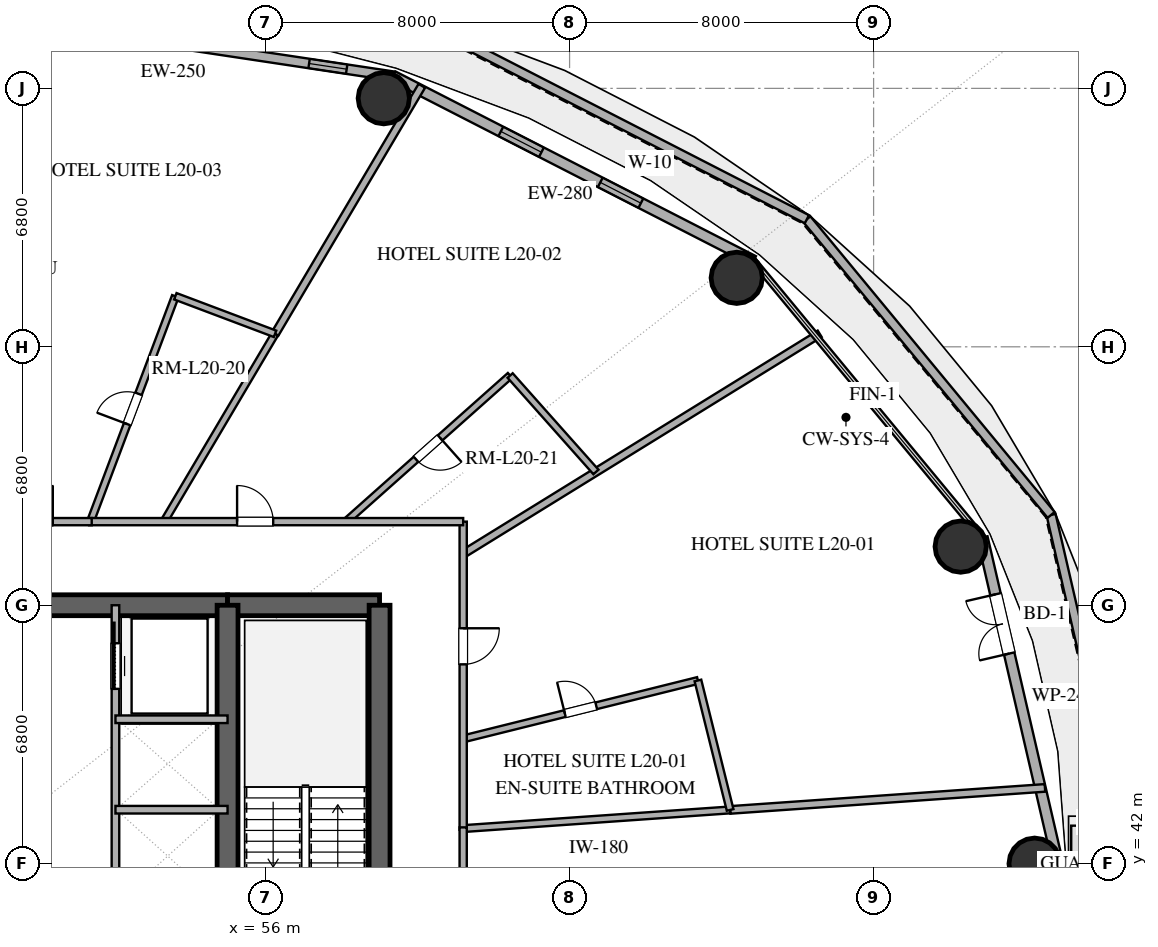
"""IFC4 building model, lengths in metres.
Left out: names, types, materials, properties, quantities, classifications, styles, units other than length and angle.
Written with IfcOpenShell. Run it as: python <this file> out.ifc"""

import sys

from ifc_helpers import new_model, si_unit, direction, frame, frame_2d, origin, origin_2d, place, context, subcontext, project, spatial, rectangle, hollow_circle, extrude, element, fill, save


model = new_model("IFC4")
c1 = context("Model", 3, precision=1e-05, world=origin(), true_north=direction((0.0, 1.0)))
c2 = subcontext(c1, "Body", "Model", "MODEL_VIEW")
j1 = project(units=[si_unit("LENGTHUNIT", "METRE"), si_unit("PLANEANGLEUNIT", "RADIAN")], contexts=[c1])
p1 = place(None, origin())
s1 = spatial("IfcSite", under=j1, at=p1, CompositionType="ELEMENT")
p2 = place(p1, origin())
s2 = spatial("IfcBuilding", under=s1, at=p2, CompositionType="ELEMENT")
p3 = place(p2, frame((0.0, 0.0, 84.0)))
s3 = spatial("IfcBuildingStorey", under=s2, at=p3, CompositionType="ELEMENT", Elevation=84.0)
p4 = place(p3, frame((41.0, 48.8, 0.0), z_axis=(0.0, 0.0, 1.0), x_axis=(1.0, 0.0, 0.0)))
e1 = element("IfcWall", 1, at=p4, inside=s3, PredefinedType="SHEAR", context=c2, shape_type="SweptSolid", body=[
    extrude(rectangle(XDim=14.0, YDim=0.55, at=frame_2d((7.0, 0.0))), origin(), (0.0, 0.0, 1.0), 3.38),
])
p5 = place(p4, frame((6.1, 0.0, 0.0)))
e2 = element("IfcOpeningElement", 2, at=p5, cuts=e1, PredefinedType="OPENING", context=c2, shape_type="SweptSolid", body=[
    extrude(rectangle(XDim=1.8, YDim=2.25, at=frame_2d((0.9, 1.125))), frame((0.0, 0.285, 0.0), z_axis=(0.0, -1.0, 0.0), x_axis=(1.0, 0.0, 0.0)), (0.0, 0.0, 1.0), 0.57),
])
p6 = place(p3, frame((55.0, 48.8, 0.0), z_axis=(0.0, 0.0, 1.0), x_axis=(1.0, 0.0, 0.0)))
e3 = element("IfcWall", 3, at=p6, inside=s3, PredefinedType="SHEAR", context=c2, shape_type="SweptSolid", body=[
    extrude(rectangle(XDim=4.0, YDim=0.55, at=frame_2d((2.0, 0.0))), origin(), (0.0, 0.0, 1.0), 3.38),
])
p7 = place(p3, frame((59.0, 35.2, 0.0), z_axis=(0.0, 0.0, 1.0), x_axis=(0.0, 1.0, 0.0)))
e4 = element("IfcWall", 4, at=p7, inside=s3, PredefinedType="SHEAR", context=c2, shape_type="SweptSolid", body=[
    extrude(rectangle(XDim=13.6, YDim=0.55, at=frame_2d((6.8, 0.0))), origin(), (0.0, 0.0, 1.0), 3.38),
])
p8 = place(p7, frame((1.5, 0.0, 0.0)))
e5 = element("IfcOpeningElement", 5, at=p8, cuts=e4, PredefinedType="OPENING", context=c2, shape_type="SweptSolid", body=[
    extrude(rectangle(XDim=1.2, YDim=2.15, at=frame_2d((0.6, 1.075))), frame((0.0, 0.285, 0.0), z_axis=(0.0, -1.0, 0.0), x_axis=(1.0, 0.0, 0.0)), (0.0, 0.0, 1.0), 0.57),
])
p9 = place(p3, frame((55.0, 35.2, 0.0), z_axis=(0.0, 0.0, 1.0), x_axis=(0.0, 1.0, 0.0)))
e6 = element("IfcWall", 6, at=p9, inside=s3, PredefinedType="SHEAR", context=c2, shape_type="SweptSolid", body=[
    extrude(rectangle(XDim=13.6, YDim=0.55, at=frame_2d((6.8, 0.0))), origin(), (0.0, 0.0, 1.0), 3.38),
])
p10 = place(p9, frame((1.15, 0.0, 0.0)))
e7 = element("IfcOpeningElement", 7, at=p10, cuts=e6, PredefinedType="OPENING", context=c2, shape_type="SweptSolid", body=[
    extrude(rectangle(XDim=1.1, YDim=2.2, at=frame_2d((0.55, 1.1))), frame((0.0, 0.285, 0.0), z_axis=(0.0, -1.0, 0.0), x_axis=(1.0, 0.0, 0.0)), (0.0, 0.0, 1.0), 0.57),
])
for number, where, z_axis, x_axis in (
    (8, (76.237, 42.0, 0.0), (0.0, 0.0, 1.0), (1.0, 0.0, 0.0)),
    (9, (74.291, 50.343, 0.0), (0.0, 0.0, 1.0), (1.0, 0.0, 0.0)),
    (10, (68.398, 57.415, 0.0), (0.0, 0.0, 1.0), (1.0, 0.0, 0.0)),
    (11, (59.11, 62.141, 0.0), (0.0, 0.0, 1.0), (1.0, 0.0, 0.0)),
):
    element("IfcColumn", number, at=place(p3, frame(where, z_axis=z_axis, x_axis=x_axis)), inside=s3, PredefinedType="COLUMN", context=c2, shape_type="SweptSolid", body=[
        extrude(hollow_circle(Radius=0.675, WallThickness=0.036, at=origin_2d()), origin(), (0.0, 0.0, 1.0), 3.38),
    ])
p11 = place(p3, frame((78.793, 42.0, 0.0), z_axis=(0.0, 0.0, 1.0), x_axis=(-0.225249461705, 0.974301123884, 0.0)))
e12 = element("IfcWall", 12, at=p11, inside=s3, PredefinedType="PARAPET", context=c2, shape_type="SweptSolid", body=[
    extrude(rectangle(XDim=9.419, YDim=0.24, at=frame_2d((4.709, 0.0))), origin(), (0.0, 0.0, 1.0), 1.25),
])
p12 = place(p3, frame((76.671, 51.177, 0.0), z_axis=(0.0, 0.0, 1.0), x_axis=(-0.636906456166, 0.770941091196, 0.0)))
e13 = element("IfcWall", 13, at=p12, inside=s3, PredefinedType="PARAPET", context=c2, shape_type="SweptSolid", body=[
    extrude(rectangle(XDim=10.091, YDim=0.24, at=frame_2d((5.045, 0.0))), origin(), (0.0, 0.0, 1.0), 1.25),
])
p13 = place(p3, frame((70.244, 58.956, 0.0), z_axis=(0.0, 0.0, 1.0), x_axis=(-0.889663800129, 0.456616165658, 0.0)))
e14 = element("IfcWall", 14, at=p13, inside=s3, PredefinedType="PARAPET", context=c2, shape_type="SweptSolid", body=[
    extrude(rectangle(XDim=11.384, YDim=0.24, at=frame_2d((5.692, 0.0))), origin(), (0.0, 0.0, 1.0), 1.25),
])
p14 = place(p3, frame((76.671, 32.823, 0.0), z_axis=(0.0, 0.0, 1.0), x_axis=(0.225249461705, 0.974301123884, 0.0)))
e15 = element("IfcWall", 15, at=p14, inside=s3, PredefinedType="PARAPET", context=c2, shape_type="SweptSolid", body=[
    extrude(rectangle(XDim=9.419, YDim=0.24, at=frame_2d((4.709, 0.0))), origin(), (0.0, 0.0, 1.0), 1.25),
])
p15 = place(p3, frame((76.849, 42.0, 0.0), z_axis=(0.0, 0.0, 1.0), x_axis=(-0.22558597182, 0.974223264616, 0.0)))
e16 = element("IfcWall", 16, at=p15, inside=s3, PredefinedType="SOLIDWALL", context=c2, shape_type="SweptSolid", body=[
    extrude(rectangle(XDim=8.811, YDim=0.28, at=frame_2d((4.405, 0.0))), origin(), (0.0, 0.0, 1.0), 3.38),
])
p16 = place(p15, frame((5.675, 0.0, 0.0)))
e17 = element("IfcOpeningElement", 17, at=p16, cuts=e16, PredefinedType="OPENING", context=c2, shape_type="SweptSolid", body=[
    extrude(rectangle(XDim=1.6, YDim=2.25, at=frame_2d((0.8, 1.125))), frame((0.0, 0.15, 0.0), z_axis=(0.0, -1.0, 0.0), x_axis=(1.0, 0.0, 0.0)), (0.0, 0.0, 1.0), 0.3),
])
p17 = place(p3, frame((68.84, 57.86, 0.0), z_axis=(0.0, 0.0, 1.0), x_axis=(-0.889959505023, 0.45603955905, 0.0)))
e18 = element("IfcWall", 18, at=p17, inside=s3, PredefinedType="SOLIDWALL", context=c2, shape_type="SweptSolid", body=[
    extrude(rectangle(XDim=10.662, YDim=0.28, at=frame_2d((5.331, 0.0))), origin(), (0.0, 0.0, 1.0), 3.38),
])
p18 = place(p17, frame((3.331, 0.0, 0.85)))
e19 = element("IfcOpeningElement", 19, at=p18, cuts=e18, PredefinedType="OPENING", context=c2, shape_type="SweptSolid", body=[
    extrude(rectangle(XDim=1.2, YDim=1.6, at=frame_2d((0.6, 0.8))), frame((0.0, 0.15, 0.0), z_axis=(0.0, -1.0, 0.0), x_axis=(1.0, 0.0, 0.0)), (0.0, 0.0, 1.0), 0.3),
])
p19 = place(p17, frame((6.271, 0.0, 0.85)))
e20 = element("IfcOpeningElement", 20, at=p19, cuts=e18, PredefinedType="OPENING", context=c2, shape_type="SweptSolid", body=[
    extrude(rectangle(XDim=1.2, YDim=1.6, at=frame_2d((0.6, 0.8))), frame((0.0, 0.15, 0.0), z_axis=(0.0, -1.0, 0.0), x_axis=(1.0, 0.0, 0.0)), (0.0, 0.0, 1.0), 0.3),
])
p20 = place(p3, frame((59.351, 62.723, 0.0), z_axis=(0.0, 0.0, 1.0), x_axis=(-0.988877774656, 0.148730450117, 0.0)))
e21 = element("IfcWall", 21, at=p20, inside=s3, PredefinedType="SOLIDWALL", context=c2, shape_type="SweptSolid", body=[
    extrude(rectangle(XDim=11.479, YDim=0.25, at=frame_2d((5.74, 0.0))), origin(), (0.0, 0.0, 1.0), 3.38),
])
p21 = place(p20, frame((1.231, 0.0, 1.42)))
e22 = element("IfcOpeningElement", 22, at=p21, cuts=e21, PredefinedType="OPENING", context=c2, shape_type="SweptSolid", body=[
    extrude(rectangle(XDim=1.0, YDim=1.05, at=frame_2d((0.5, 0.525))), frame((0.0, 0.135, 0.0), z_axis=(0.0, -1.0, 0.0), x_axis=(1.0, 0.0, 0.0)), (0.0, 0.0, 1.0), 0.27),
])
p22 = place(p3, frame((74.861, 33.417, 0.0), z_axis=(0.0, 0.0, 1.0), x_axis=(0.22558597182, 0.974223264616, 0.0)))
e23 = element("IfcWall", 23, at=p22, inside=s3, PredefinedType="SOLIDWALL", context=c2, shape_type="SweptSolid", body=[
    extrude(rectangle(XDim=8.811, YDim=0.25, at=frame_2d((4.405, 0.0))), origin(), (0.0, 0.0, 1.0), 3.38),
])
p23 = place(p3, frame((52.05, 38.4, 0.0), z_axis=(0.0, 0.0, 1.0), x_axis=(0.0, 1.0, 0.0)))
e24 = element("IfcWall", 24, at=p23, inside=s3, PredefinedType="SOLIDWALL", context=c2, shape_type="SweptSolid", body=[
    extrude(rectangle(XDim=10.4, YDim=0.2, at=frame_2d((5.2, 0.0))), origin(), (0.0, 0.0, 1.0), 2.74),
])
p24 = place(p23, frame((8.2, 0.0, 0.0)))
e25 = element("IfcOpeningElement", 25, at=p24, cuts=e24, PredefinedType="OPENING", context=c2, shape_type="SweptSolid", body=[
    extrude(rectangle(XDim=1.2, YDim=2.2, at=frame_2d((0.6, 1.1))), frame((0.0, 0.11, 0.0), z_axis=(0.0, -1.0, 0.0), x_axis=(1.0, 0.0, 0.0)), (0.0, 0.0, 1.0), 0.22),
])
for number, where, z_axis, x_axis in (
    (26, (52.05, 43.42, 0.0), (0.0, 0.0, 1.0), (1.0, 0.0, 0.0)),
    (27, (52.05, 45.8, 0.0), (0.0, 0.0, 1.0), (1.0, 0.0, 0.0)),
):
    element("IfcWall", number, at=place(p3, frame(where, z_axis=z_axis, x_axis=x_axis)), inside=s3, PredefinedType="SOLIDWALL", context=c2, shape_type="SweptSolid", body=[
        extrude(rectangle(XDim=2.95, YDim=0.2, at=frame_2d((1.475, 0.0))), origin(), (0.0, 0.0, 1.0), 2.74),
    ])
p25 = place(p3, frame((76.509, 43.994, 0.0), z_axis=(0.0, 0.0, 1.0), x_axis=(-0.997563838401, -0.069759503404, 0.0)))
e28 = element("IfcWall", 28, at=p25, inside=s3, PredefinedType="PARTITIONING", context=c2, shape_type="SweptSolid", body=[
    extrude(rectangle(XDim=8.305, YDim=0.2, at=frame_2d((4.152, 0.0))), origin(), (0.0, 0.0, 1.0), 2.74),
])
p26 = place(p3, frame((60.112, 62.468, 0.0), z_axis=(0.0, 0.0, 1.0), x_axis=(-0.509263960295, -0.860610375689, 0.0)))
e29 = element("IfcWall", 29, at=p26, inside=s3, PredefinedType="PARTITIONING", context=c2, shape_type="SweptSolid", body=[
    extrude(rectangle(XDim=7.583, YDim=0.2, at=frame_2d((3.792, 0.0))), origin(), (0.0, 0.0, 1.0), 2.74),
])
p27 = place(p3, frame((68.224, 43.414, 0.0), z_axis=(0.0, 0.0, 1.0), x_axis=(-0.997563891584, -0.06975874287, 0.0)))
e30 = element("IfcWall", 30, at=p27, inside=s3, PredefinedType="PLUMBINGWALL", context=c2, shape_type="SweptSolid", body=[
    extrude(rectangle(XDim=7.042, YDim=0.18, at=frame_2d((3.521, 0.0))), origin(), (0.0, 0.0, 1.0), 2.74),
])
p28 = place(p3, frame((61.2, 50.15, 0.0), z_axis=(0.0, 0.0, 1.0), x_axis=(0.850874276333, 0.525369361377, 0.0)))
e31 = element("IfcWall", 31, at=p28, inside=s3, PredefinedType="PARTITIONING", context=c2, shape_type="SweptSolid", body=[
    extrude(rectangle(XDim=11.026, YDim=0.2, at=frame_2d((5.513, 0.0))), origin(), (0.0, 0.0, 1.0), 2.74),
])
p29 = place(p3, frame((61.2, 45.284, 0.0), z_axis=(0.0, 0.0, 1.0), x_axis=(0.970426102609, 0.241398383125, 0.0)))
e32 = element("IfcWall", 32, at=p29, inside=s3, PredefinedType="PLUMBINGWALL", context=c2, shape_type="SweptSolid", body=[
    extrude(rectangle(XDim=6.365, YDim=0.18, at=frame_2d((3.183, 0.0))), origin(), (0.0, 0.0, 1.0), 2.74),
])
p30 = place(p29, frame((2.758, 0.0, 0.0)))
e33 = element("IfcOpeningElement", 33, at=p30, cuts=e32, PredefinedType="OPENING", context=c2, shape_type="SweptSolid", body=[
    extrude(rectangle(XDim=0.85, YDim=2.1, at=frame_2d((0.425, 1.05))), frame((0.0, 0.1, 0.0), z_axis=(0.0, -1.0, 0.0), x_axis=(1.0, 0.0, 0.0)), (0.0, 0.0, 1.0), 0.2),
])
p31 = place(p3, frame((51.391, 51.0, 0.0), z_axis=(0.0, 0.0, 1.0), x_axis=(0.352583810303, 0.935780239539, 0.0)))
e34 = element("IfcWall", 34, at=p31, inside=s3, PredefinedType="PLUMBINGWALL", context=c2, shape_type="SweptSolid", body=[
    extrude(rectangle(XDim=6.337, YDim=0.18, at=frame_2d((3.168, 0.0))), origin(), (0.0, 0.0, 1.0), 2.74),
])
p32 = place(p31, frame((2.744, 0.0, 0.0)))
e35 = element("IfcOpeningElement", 35, at=p32, cuts=e34, PredefinedType="OPENING", context=c2, shape_type="SweptSolid", body=[
    extrude(rectangle(XDim=0.85, YDim=2.1, at=frame_2d((0.425, 1.05))), frame((0.0, 0.1, 0.0), z_axis=(0.0, -1.0, 0.0), x_axis=(1.0, 0.0, 0.0)), (0.0, 0.0, 1.0), 0.2),
])
p33 = place(p3, frame((62.436, 54.844, 0.0), z_axis=(0.0, 0.0, 1.0), x_axis=(-0.747085499985, -0.664727956168, 0.0)))
e36 = element("IfcWall", 36, at=p33, inside=s3, PredefinedType="PLUMBINGWALL", context=c2, shape_type="SweptSolid", body=[
    extrude(rectangle(XDim=5.783, YDim=0.18, at=frame_2d((2.892, 0.0))), origin(), (0.0, 0.0, 1.0), 2.74),
])
p34 = place(p33, frame((2.467, 0.0, 0.0)))
e37 = element("IfcOpeningElement", 37, at=p34, cuts=e36, PredefinedType="OPENING", context=c2, shape_type="SweptSolid", body=[
    extrude(rectangle(XDim=0.85, YDim=2.1, at=frame_2d((0.425, 1.05))), frame((0.0, 0.1, 0.0), z_axis=(0.0, -1.0, 0.0), x_axis=(1.0, 0.0, 0.0)), (0.0, 0.0, 1.0), 0.2),
])
p35 = place(p3, frame((56.25, 55.941, 0.0), z_axis=(0.0, 0.0, 1.0), x_axis=(-0.509296473297, -0.860591135376, 0.0)))
e38 = element("IfcWall", 38, at=p35, inside=s3, PredefinedType="PLUMBINGWALL", context=c2, shape_type="SweptSolid", body=[
    extrude(rectangle(XDim=5.742, YDim=0.18, at=frame_2d((2.871, 0.0))), origin(), (0.0, 0.0, 1.0), 2.74),
])
p36 = place(p3, frame((61.2, 51.0, 0.0), z_axis=(0.0, 0.0, 1.0), x_axis=(0.0, -1.0, 0.0)))
e39 = element("IfcWall", 39, at=p36, inside=s3, PredefinedType="PARTITIONING", context=c2, shape_type="SweptSolid", body=[
    extrude(rectangle(XDim=8.109, YDim=0.19, at=frame_2d((4.055, 0.0))), origin(), (0.0, 0.0, 1.0), 2.74),
])
p37 = place(p36, frame((2.806, 0.0, 0.0)))
e40 = element("IfcOpeningElement", 40, at=p37, cuts=e39, PredefinedType="OPENING", context=c2, shape_type="SweptSolid", body=[
    extrude(rectangle(XDim=0.95, YDim=2.15, at=frame_2d((0.475, 1.075))), frame((0.0, 0.105, 0.0), z_axis=(0.0, -1.0, 0.0), x_axis=(1.0, 0.0, 0.0)), (0.0, 0.0, 1.0), 0.21),
])
p38 = place(p3, frame((51.357, 51.0, 0.0), z_axis=(0.0, 0.0, 1.0), x_axis=(1.0, 0.0, 0.0)))
e41 = element("IfcWall", 41, at=p38, inside=s3, PredefinedType="PARTITIONING", context=c2, shape_type="SweptSolid", body=[
    extrude(rectangle(XDim=9.843, YDim=0.19, at=frame_2d((4.921, 0.0))), origin(), (0.0, 0.0, 1.0), 2.74),
])
p39 = place(p38, frame((3.894, 0.0, 0.0)))
e42 = element("IfcOpeningElement", 42, at=p39, cuts=e41, PredefinedType="OPENING", context=c2, shape_type="SweptSolid", body=[
    extrude(rectangle(XDim=0.95, YDim=2.15, at=frame_2d((0.475, 1.075))), frame((0.0, 0.105, 0.0), z_axis=(0.0, -1.0, 0.0), x_axis=(1.0, 0.0, 0.0)), (0.0, 0.0, 1.0), 0.21),
])
p40 = place(p3, frame((43.812, 51.0, 0.0), z_axis=(0.0, 0.0, 1.0), x_axis=(1.0, 0.0, 0.0)))
e43 = element("IfcWall", 43, at=p40, inside=s3, PredefinedType="PARTITIONING", context=c2, shape_type="SweptSolid", body=[
    extrude(rectangle(XDim=7.613, YDim=0.19, at=frame_2d((3.807, 0.0))), origin(), (0.0, 0.0, 1.0), 2.74),
])
p41 = place(p40, frame((1.84, 0.0, 0.0)))
e44 = element("IfcOpeningElement", 44, at=p41, cuts=e43, PredefinedType="OPENING", context=c2, shape_type="SweptSolid", body=[
    extrude(rectangle(XDim=1.0, YDim=2.2, at=frame_2d((0.5, 1.1))), frame((0.0, 0.105, 0.0), z_axis=(0.0, -1.0, 0.0), x_axis=(1.0, 0.0, 0.0)), (0.0, 0.0, 1.0), 0.21),
])
p42 = place(p40, frame((5.639, 0.0, 0.0)))
e45 = element("IfcOpeningElement", 45, at=p42, cuts=e43, PredefinedType="OPENING", context=c2, shape_type="SweptSolid", body=[
    extrude(rectangle(XDim=0.95, YDim=2.15, at=frame_2d((0.475, 1.075))), frame((0.0, 0.105, 0.0), z_axis=(0.0, -1.0, 0.0), x_axis=(1.0, 0.0, 0.0)), (0.0, 0.0, 1.0), 0.21),
])
p43 = place(p3, frame((61.2, 42.955, 0.0), z_axis=(0.0, 0.0, 1.0), x_axis=(0.0, -1.0, 0.0)))
e46 = element("IfcWall", 46, at=p43, inside=s3, PredefinedType="PARTITIONING", context=c2, shape_type="SweptSolid", body=[
    extrude(rectangle(XDim=6.782, YDim=0.19, at=frame_2d((3.391, 0.0))), origin(), (0.0, 0.0, 1.0), 2.74),
])
p44 = place(p43, frame((1.631, 0.0, 0.0)))
e47 = element("IfcOpeningElement", 47, at=p44, cuts=e46, PredefinedType="OPENING", context=c2, shape_type="SweptSolid", body=[
    extrude(rectangle(XDim=0.95, YDim=2.15, at=frame_2d((0.475, 1.075))), frame((0.0, 0.105, 0.0), z_axis=(0.0, -1.0, 0.0), x_axis=(1.0, 0.0, 0.0)), (0.0, 0.0, 1.0), 0.21),
])
p45 = place(p3, frame((67.377, 46.82, 0.0), z_axis=(0.0, 0.0, 1.0), x_axis=(0.241373388957, -0.970432319692, 0.0)))
e48 = element("IfcWall", 48, at=p45, inside=s3, PredefinedType="PLUMBINGWALL", context=c2, shape_type="SweptSolid", body=[
    extrude(rectangle(XDim=3.51, YDim=0.18, at=frame_2d((1.755, 0.0))), origin(), (0.0, 0.0, 1.0), 2.74),
])
p46 = place(p3, frame((64.694, 52.307, 0.0), z_axis=(0.0, 0.0, 1.0), x_axis=(-0.664720670732, 0.747091982222, 0.0)))
e49 = element("IfcWall", 49, at=p46, inside=s3, PredefinedType="PLUMBINGWALL", context=c2, shape_type="SweptSolid", body=[
    extrude(rectangle(XDim=3.397, YDim=0.18, at=frame_2d((1.698, 0.0))), origin(), (0.0, 0.0, 1.0), 2.74),
])
p47 = place(p3, frame((53.625, 56.93, 0.0), z_axis=(0.0, 0.0, 1.0), x_axis=(0.93579147225, -0.352553996522, 0.0)))
e50 = element("IfcWall", 50, at=p47, inside=s3, PredefinedType="PLUMBINGWALL", context=c2, shape_type="SweptSolid", body=[
    extrude(rectangle(XDim=2.805, YDim=0.18, at=frame_2d((1.402, 0.0))), origin(), (0.0, 0.0, 1.0), 2.74),
])
p48 = place(p3, origin())
p49 = place(p48, frame((77.75, 42.0, 0.0)))
p50 = place(p49, frame((0.0, 0.0, 0.11)))
e51 = element("IfcDoor", 51, at=p50, inside=s3, OperationType="SINGLE_SWING_LEFT", PredefinedType="TRAPDOOR", context=c2, shape_type="SweptSolid", body=[
    extrude(rectangle(XDim=1.1, YDim=2.0, at=origin_2d()), origin(), (0.0, 0.0, 1.0), 0.05),
])
p51 = place(p16, origin())
e52 = element("IfcDoor", 52, at=p51, inside=s3, OperationType="DOUBLE_DOOR_SINGLE_SWING", PredefinedType="DOOR", context=c2, shape_type="SweptSolid", body=[
    extrude(rectangle(XDim=1.6, YDim=2.25, at=frame_2d((0.8, 1.125))), frame((0.0, 0.025, 0.0), z_axis=(0.0, -1.0, 0.0), x_axis=(1.0, 0.0, 0.0)), (0.0, 0.0, 1.0), 0.05),
])
fill(e17, e52)
p52 = place(p18, origin())
e53 = element("IfcWindow", 53, at=p52, inside=s3, PartitioningType="SINGLE_PANEL", PredefinedType="WINDOW", context=c2, shape_type="SweptSolid", body=[
    extrude(rectangle(XDim=1.2, YDim=1.6, at=frame_2d((0.6, 0.8))), frame((0.0, 0.03, 0.0), z_axis=(0.0, -1.0, 0.0), x_axis=(1.0, 0.0, 0.0)), (0.0, 0.0, 1.0), 0.06),
])
fill(e19, e53)
p53 = place(p19, origin())
e54 = element("IfcWindow", 54, at=p53, inside=s3, PartitioningType="SINGLE_PANEL", PredefinedType="WINDOW", context=c2, shape_type="SweptSolid", body=[
    extrude(rectangle(XDim=1.2, YDim=1.6, at=frame_2d((0.6, 0.8))), frame((0.0, 0.03, 0.0), z_axis=(0.0, -1.0, 0.0), x_axis=(1.0, 0.0, 0.0)), (0.0, 0.0, 1.0), 0.06),
])
fill(e20, e54)
p54 = place(p21, origin())
e55 = element("IfcWindow", 55, at=p54, inside=s3, PartitioningType="SINGLE_PANEL", PredefinedType="WINDOW", context=c2, shape_type="SweptSolid", body=[
    extrude(rectangle(XDim=1.0, YDim=1.05, at=frame_2d((0.5, 0.525))), frame((0.0, 0.03, 0.0), z_axis=(0.0, -1.0, 0.0), x_axis=(1.0, 0.0, 0.0)), (0.0, 0.0, 1.0), 0.06),
])
fill(e22, e55)
p55 = place(p24, origin())
e56 = element("IfcDoor", 56, at=p55, inside=s3, OperationType="SLIDING_TO_RIGHT", PredefinedType="DOOR", context=c2, shape_type="SweptSolid", body=[
    extrude(rectangle(XDim=1.2, YDim=2.2, at=frame_2d((0.6, 1.1))), frame((0.0, 0.025, 0.0), z_axis=(0.0, -1.0, 0.0), x_axis=(1.0, 0.0, 0.0)), (0.0, 0.0, 1.0), 0.05),
])
fill(e25, e56)
p56 = place(p30, origin())
e57 = element("IfcDoor", 57, at=p56, inside=s3, OperationType="SINGLE_SWING_LEFT", PredefinedType="DOOR", context=c2, shape_type="SweptSolid", body=[
    extrude(rectangle(XDim=0.85, YDim=2.1, at=frame_2d((0.425, 1.05))), frame((0.0, 0.025, 0.0), z_axis=(0.0, -1.0, 0.0), x_axis=(1.0, 0.0, 0.0)), (0.0, 0.0, 1.0), 0.05),
])
fill(e33, e57)
p57 = place(p32, origin())
e58 = element("IfcDoor", 58, at=p57, inside=s3, OperationType="SINGLE_SWING_LEFT", PredefinedType="DOOR", context=c2, shape_type="SweptSolid", body=[
    extrude(rectangle(XDim=0.85, YDim=2.1, at=frame_2d((0.425, 1.05))), frame((0.0, 0.025, 0.0), z_axis=(0.0, -1.0, 0.0), x_axis=(1.0, 0.0, 0.0)), (0.0, 0.0, 1.0), 0.05),
])
fill(e35, e58)
p58 = place(p34, origin())
e59 = element("IfcDoor", 59, at=p58, inside=s3, OperationType="SINGLE_SWING_LEFT", PredefinedType="DOOR", context=c2, shape_type="SweptSolid", body=[
    extrude(rectangle(XDim=0.85, YDim=2.1, at=frame_2d((0.425, 1.05))), frame((0.0, 0.025, 0.0), z_axis=(0.0, -1.0, 0.0), x_axis=(1.0, 0.0, 0.0)), (0.0, 0.0, 1.0), 0.05),
])
fill(e37, e59)
p59 = place(p37, origin())
e60 = element("IfcDoor", 60, at=p59, inside=s3, OperationType="SINGLE_SWING_LEFT", PredefinedType="DOOR", context=c2, shape_type="SweptSolid", body=[
    extrude(rectangle(XDim=0.95, YDim=2.15, at=frame_2d((0.475, 1.075))), frame((0.0, 0.025, 0.0), z_axis=(0.0, -1.0, 0.0), x_axis=(1.0, 0.0, 0.0)), (0.0, 0.0, 1.0), 0.05),
])
fill(e40, e60)
p60 = place(p39, origin())
e61 = element("IfcDoor", 61, at=p60, inside=s3, OperationType="SINGLE_SWING_LEFT", PredefinedType="DOOR", context=c2, shape_type="SweptSolid", body=[
    extrude(rectangle(XDim=0.95, YDim=2.15, at=frame_2d((0.475, 1.075))), frame((0.0, 0.025, 0.0), z_axis=(0.0, -1.0, 0.0), x_axis=(1.0, 0.0, 0.0)), (0.0, 0.0, 1.0), 0.05),
])
fill(e42, e61)
p61 = place(p42, origin())
e62 = element("IfcDoor", 62, at=p61, inside=s3, OperationType="SINGLE_SWING_RIGHT", PredefinedType="DOOR", context=c2, shape_type="SweptSolid", body=[
    extrude(rectangle(XDim=0.95, YDim=2.15, at=frame_2d((0.475, 1.075))), frame((0.0, 0.025, 0.0), z_axis=(0.0, -1.0, 0.0), x_axis=(1.0, 0.0, 0.0)), (0.0, 0.0, 1.0), 0.05),
])
fill(e45, e62)
save(model, sys.argv[1])
